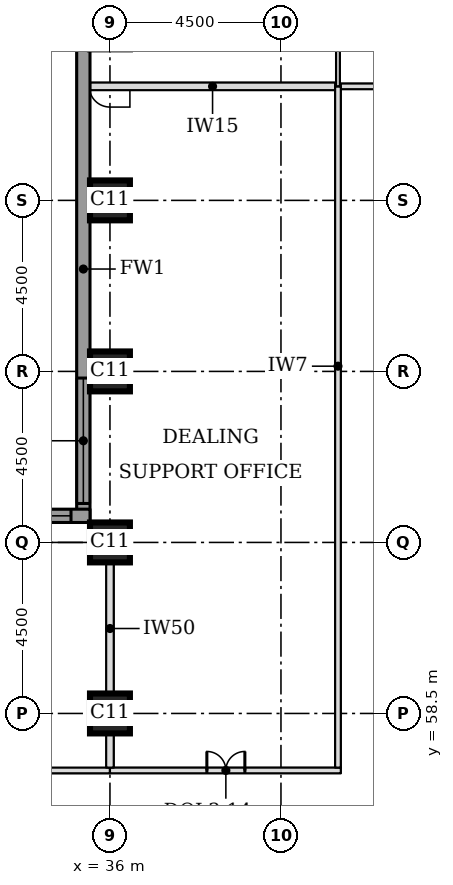
"""IFC4 building model, lengths in metres.
Left out: names, types, materials, properties, quantities, classifications, styles, units other than length and angle.
Written with IfcOpenShell. Run it as: python <this file> out.ifc"""

import sys

from ifc_helpers import new_model, si_unit, direction, frame, frame_2d, origin, origin_2d, place, context, subcontext, project, spatial, rectangle, extrude, element, fill, save


model = new_model("IFC4")
c1 = context("Model", 3, precision=1e-05, world=origin(), true_north=direction((0.0, 1.0)))
c2 = subcontext(c1, "Body", "Model", "MODEL_VIEW")
j1 = project(units=[si_unit("LENGTHUNIT", "METRE"), si_unit("PLANEANGLEUNIT", "RADIAN")], contexts=[c1])
p1 = place(None, origin())
s1 = spatial("IfcSite", under=j1, at=p1, CompositionType="ELEMENT")
p2 = place(p1, origin())
s2 = spatial("IfcBuilding", under=s1, at=p2, CompositionType="ELEMENT")
p3 = place(p2, frame((0.0, 0.0, 93.7)))
s3 = spatial("IfcBuildingStorey", under=s2, at=p3, CompositionType="ELEMENT", Elevation=93.7)
for number, where, z_axis, x_axis in (
    (1, (36.0, 58.5, 0.0), (0.0, 0.0, 1.0), (1.0, 0.0, 0.0)),
    (2, (36.0, 63.0, 0.0), (0.0, 0.0, 1.0), (1.0, 0.0, 0.0)),
    (3, (36.0, 67.5, 0.0), (0.0, 0.0, 1.0), (1.0, 0.0, 0.0)),
    (4, (36.0, 72.0, 0.0), (0.0, 0.0, 1.0), (1.0, 0.0, 0.0)),
):
    element("IfcColumn", number, at=place(p3, frame(where, z_axis=z_axis, x_axis=x_axis)), inside=s3, PredefinedType="COLUMN", context=c2, shape_type="SweptSolid", body=[
        extrude(rectangle(XDim=1.05, YDim=1.05, at=origin_2d()), origin(), (0.0, 0.0, 1.0), 3.7),
    ])
p4 = place(p3, frame((35.3, 76.862, 0.0), z_axis=(0.0, 0.0, 1.0), x_axis=(0.0, -1.0, 0.0)))
e5 = element("IfcWall", 5, at=p4, inside=s3, PredefinedType="STANDARD", context=c2, shape_type="SweptSolid", body=[
    extrude(rectangle(XDim=13.337, YDim=0.35, at=frame_2d((6.669, 0.0))), origin(), (0.0, 0.0, 1.0), 3.525),
])
p5 = place(p4, frame((9.537, 0.0, 0.9)))
e6 = element("IfcOpeningElement", 6, at=p5, cuts=e5, PredefinedType="OPENING", context=c2, shape_type="SweptSolid", body=[
    extrude(rectangle(XDim=3.3, YDim=1.9, at=frame_2d((1.65, 0.95))), frame((0.0, 0.185, 0.0), z_axis=(0.0, -1.0, 0.0), x_axis=(1.0, 0.0, 0.0)), (0.0, 0.0, 1.0), 0.37),
])
p6 = place(p3, frame((35.475, 63.7, 0.0), z_axis=(0.0, 0.0, 1.0), x_axis=(-1.0, 0.0, 0.0)))
e7 = element("IfcWall", 7, at=p6, inside=s3, PredefinedType="STANDARD", context=c2, shape_type="SweptSolid", body=[
    extrude(rectangle(XDim=17.837, YDim=0.35, at=frame_2d((8.919, 0.0))), origin(), (0.0, 0.0, 1.0), 3.525),
])
p7 = place(p6, frame((0.5, 0.0, 0.9)))
e8 = element("IfcOpeningElement", 8, at=p7, cuts=e7, PredefinedType="OPENING", context=c2, shape_type="SweptSolid", body=[
    extrude(rectangle(XDim=3.3, YDim=1.9, at=frame_2d((1.65, 0.95))), frame((0.0, 0.185, 0.0), z_axis=(0.0, -1.0, 0.0), x_axis=(1.0, 0.0, 0.0)), (0.0, 0.0, 1.0), 0.37),
])
p8 = place(p6, frame((9.075, 0.0, 0.9)))
e9 = element("IfcOpeningElement", 9, at=p8, cuts=e7, PredefinedType="OPENING", context=c2, shape_type="SweptSolid", body=[
    extrude(rectangle(XDim=3.3, YDim=1.9, at=frame_2d((1.65, 0.95))), frame((0.0, 0.185, 0.0), z_axis=(0.0, -1.0, 0.0), x_axis=(1.0, 0.0, 0.0)), (0.0, 0.0, 1.0), 0.37),
])
p9 = place(p3, frame((29.38, 57.0, 0.0), z_axis=(0.0, 0.0, 1.0), x_axis=(1.0, 0.0, 0.0)))
e10 = element("IfcWall", 10, at=p9, inside=s3, PredefinedType="PARTITIONING", context=c2, shape_type="SweptSolid", body=[
    extrude(rectangle(XDim=6.62, YDim=0.15, at=frame_2d((3.31, 0.0))), origin(), (0.0, 0.0, 1.0), 3.55),
])
p10 = place(p9, frame((2.88, 0.0, 0.0)))
e11 = element("IfcOpeningElement", 11, at=p10, cuts=e10, PredefinedType="OPENING", context=c2, shape_type="SweptSolid", body=[
    extrude(rectangle(XDim=1.0, YDim=2.1, at=frame_2d((0.5, 1.05))), frame((0.0, 0.085, 0.0), z_axis=(0.0, -1.0, 0.0), x_axis=(1.0, 0.0, 0.0)), (0.0, 0.0, 1.0), 0.17),
])
p11 = place(p3, frame((36.0, 57.0, 0.0), z_axis=(0.0, 0.0, 1.0), x_axis=(1.0, 0.0, 0.0)))
e12 = element("IfcWall", 12, at=p11, inside=s3, PredefinedType="PARTITIONING", context=c2, shape_type="SweptSolid", body=[
    extrude(rectangle(XDim=6.075, YDim=0.15, at=frame_2d((3.038, 0.0))), origin(), (0.0, 0.0, 1.0), 3.55),
])
p12 = place(p11, frame((2.55, 0.0, 0.0)))
e13 = element("IfcOpeningElement", 13, at=p12, cuts=e12, PredefinedType="OPENING", context=c2, shape_type="SweptSolid", body=[
    extrude(rectangle(XDim=1.0, YDim=2.1, at=frame_2d((0.5, 1.05))), frame((0.0, 0.085, 0.0), z_axis=(0.0, -1.0, 0.0), x_axis=(1.0, 0.0, 0.0)), (0.0, 0.0, 1.0), 0.17),
])
p13 = place(p3, frame((35.475, 75.0, 0.0), z_axis=(0.0, 0.0, 1.0), x_axis=(1.0, 0.0, 0.0)))
e14 = element("IfcWall", 14, at=p13, inside=s3, PredefinedType="PARTITIONING", context=c2, shape_type="SweptSolid", body=[
    extrude(rectangle(XDim=6.45, YDim=0.2, at=frame_2d((3.225, 0.0))), origin(), (0.0, 0.0, 1.0), 3.55),
])
p14 = place(p3, frame((42.075, 75.0, 0.0), z_axis=(0.0, 0.0, 1.0), x_axis=(1.0, 0.0, 0.0)))
e15 = element("IfcWall", 15, at=p14, inside=s3, PredefinedType="PARTITIONING", context=c2, shape_type="SweptSolid", body=[
    extrude(rectangle(XDim=7.425, YDim=0.15, at=frame_2d((3.712, 0.0))), origin(), (0.0, 0.0, 1.0), 3.55),
])
p15 = place(p14, frame((3.2, 0.0, 0.0)))
e16 = element("IfcOpeningElement", 16, at=p15, cuts=e15, PredefinedType="OPENING", context=c2, shape_type="SweptSolid", body=[
    extrude(rectangle(XDim=1.0, YDim=2.1, at=frame_2d((0.5, 1.05))), frame((0.0, 0.085, 0.0), z_axis=(0.0, -1.0, 0.0), x_axis=(1.0, 0.0, 0.0)), (0.0, 0.0, 1.0), 0.17),
])
p16 = place(p3, frame((36.0, 57.075, 0.0), z_axis=(0.0, 0.0, 1.0), x_axis=(0.0, 1.0, 0.0)))
e17 = element("IfcWall", 17, at=p16, inside=s3, PredefinedType="PARTITIONING", context=c2, shape_type="SweptSolid", body=[
    extrude(rectangle(XDim=0.9, YDim=0.2, at=frame_2d((0.45, 0.0))), origin(), (0.0, 0.0, 1.0), 2.8),
])
p17 = place(p3, frame((42.0, 57.075, 0.0), z_axis=(0.0, 0.0, 1.0), x_axis=(0.0, 1.0, 0.0)))
e18 = element("IfcWall", 18, at=p17, inside=s3, PredefinedType="PARTITIONING", context=c2, shape_type="SweptSolid", body=[
    extrude(rectangle(XDim=17.925, YDim=0.15, at=frame_2d((8.962, 0.0))), origin(), (0.0, 0.0, 1.0), 3.55),
])
p18 = place(p3, frame((36.0, 58.995, 0.0), z_axis=(0.0, 0.0, 1.0), x_axis=(0.0, 1.0, 0.0)))
e19 = element("IfcWall", 19, at=p18, inside=s3, PredefinedType="PARTITIONING", context=c2, shape_type="SweptSolid", body=[
    extrude(rectangle(XDim=3.48, YDim=0.2, at=frame_2d((1.74, 0.0))), origin(), (0.0, 0.0, 1.0), 2.8),
])
p19 = place(p3, frame((42.0, 75.0, 0.0), z_axis=(0.0, 0.0, 1.0), x_axis=(0.0, 1.0, 0.0)))
e20 = element("IfcWall", 20, at=p19, inside=s3, PredefinedType="PARTITIONING", context=c2, shape_type="SweptSolid", body=[
    extrude(rectangle(XDim=2.95, YDim=0.1, at=frame_2d((1.475, 0.0))), origin(), (0.0, 0.0, 1.0), 3.55),
])
p20 = place(p5, origin())
e21 = element("IfcWindow", 21, at=p20, inside=s3, PartitioningType="SINGLE_PANEL", PredefinedType="WINDOW", context=c2, shape_type="SweptSolid", body=[
    extrude(rectangle(XDim=3.3, YDim=1.9, at=frame_2d((1.65, 0.95))), frame((0.0, 0.085, 0.0), z_axis=(0.0, -1.0, 0.0), x_axis=(1.0, 0.0, 0.0)), (0.0, 0.0, 1.0), 0.06),
])
fill(e6, e21)
p21 = place(p7, origin())
e22 = element("IfcWindow", 22, at=p21, inside=s3, PartitioningType="SINGLE_PANEL", PredefinedType="WINDOW", context=c2, shape_type="SweptSolid", body=[
    extrude(rectangle(XDim=3.3, YDim=1.9, at=frame_2d((1.65, 0.95))), frame((0.0, 0.085, 0.0), z_axis=(0.0, -1.0, 0.0), x_axis=(1.0, 0.0, 0.0)), (0.0, 0.0, 1.0), 0.06),
])
fill(e8, e22)
p22 = place(p12, origin())
e23 = element("IfcDoor", 23, at=p22, inside=s3, OperationType="DOUBLE_DOOR_SINGLE_SWING", PredefinedType="DOOR", context=c2, shape_type="SweptSolid", body=[
    extrude(rectangle(XDim=1.0, YDim=2.1, at=frame_2d((0.5, 1.05))), frame((0.0, 0.025, 0.0), z_axis=(0.0, -1.0, 0.0), x_axis=(1.0, 0.0, 0.0)), (0.0, 0.0, 1.0), 0.05),
])
fill(e13, e23)
save(model, sys.argv[1])
